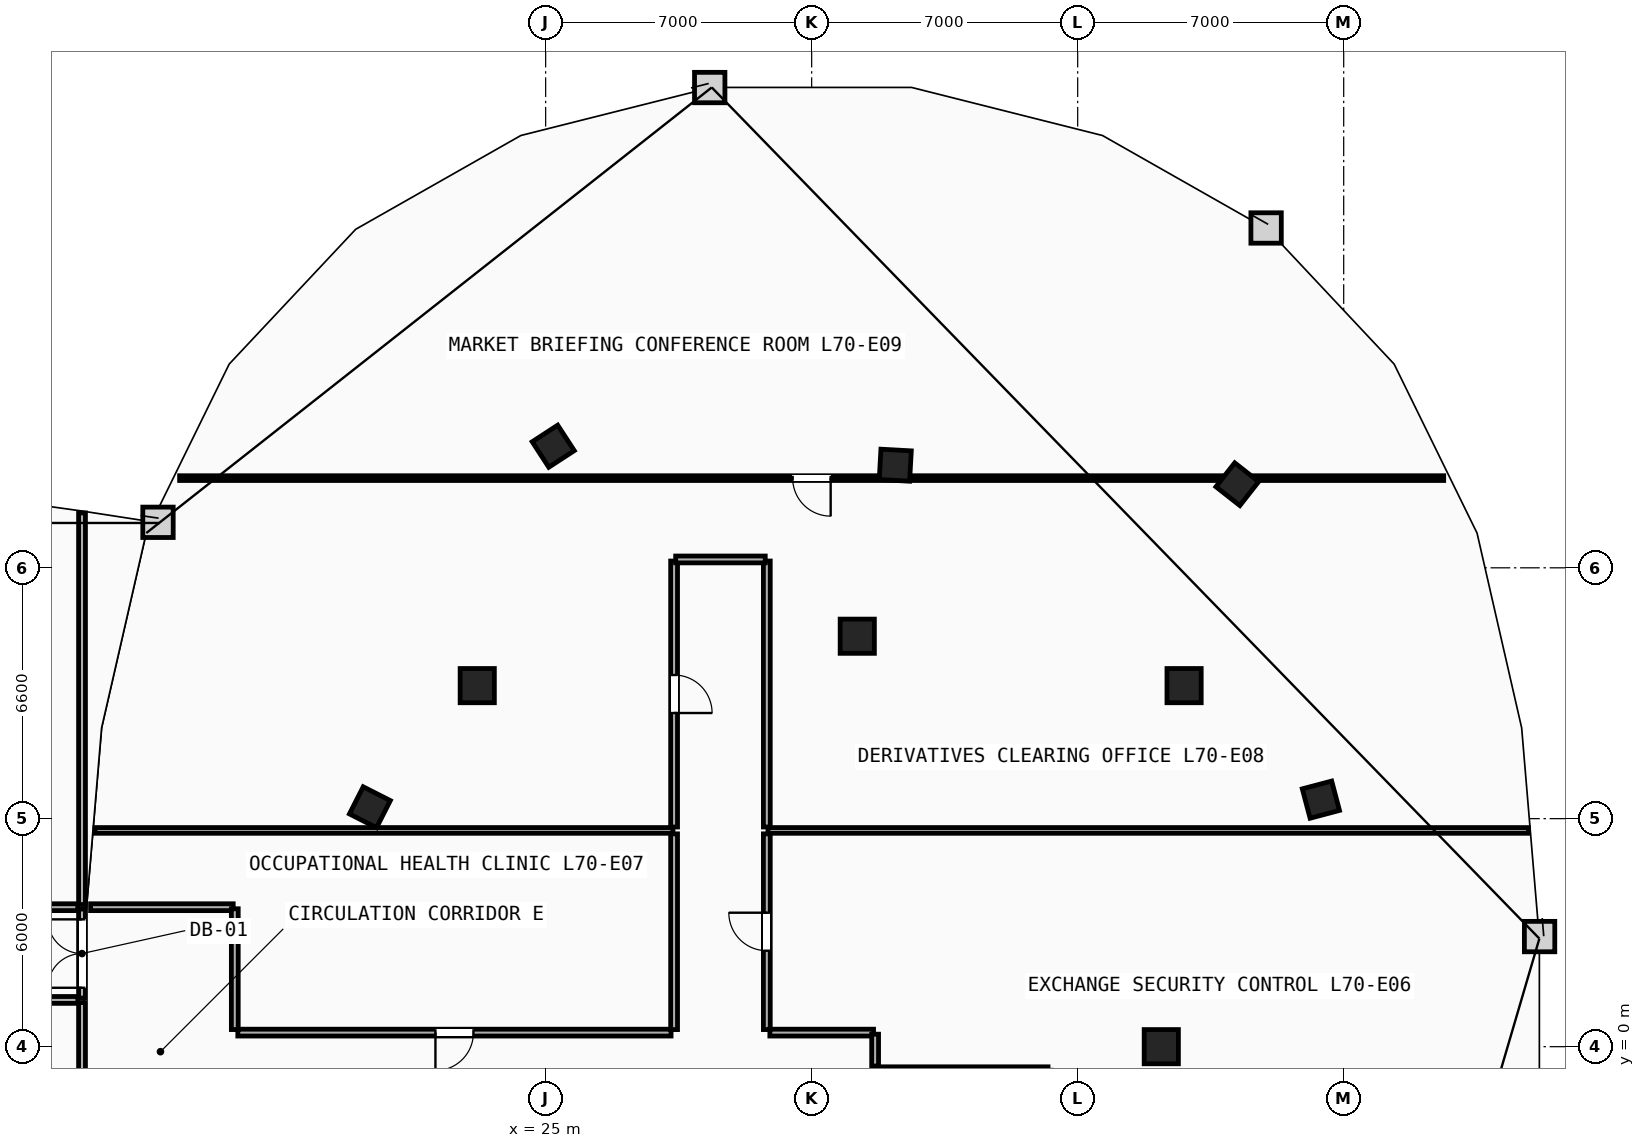
"""IFC4 building model, lengths in metres.
Left out: names, types, materials, properties, quantities, classifications, styles, units other than length and angle.
Written with IfcOpenShell. Run it as: python <this file> out.ifc"""

import sys

from ifc_helpers import new_model, si_unit, direction, frame, frame_2d, origin, origin_2d, place, context, subcontext, project, spatial, rectangle, extrude, element, fill, save


model = new_model("IFC4")
c1 = context("Model", 3, precision=1e-05, world=origin(), true_north=direction((0.0, 1.0)))
c2 = subcontext(c1, "Body", "Model", "MODEL_VIEW")
j1 = project(units=[si_unit("LENGTHUNIT", "METRE"), si_unit("PLANEANGLEUNIT", "RADIAN")], contexts=[c1])
p1 = place(None, origin())
s1 = spatial("IfcSite", under=j1, at=p1, CompositionType="ELEMENT")
p2 = place(p1, origin())
s2 = spatial("IfcBuilding", under=s1, at=p2, CompositionType="ELEMENT")
p3 = place(p2, frame((0.0, 0.0, 264.8)))
s3 = spatial("IfcBuildingStorey", under=s2, at=p3, CompositionType="ELEMENT", Elevation=264.8)
for number, where, z_axis, x_axis in (
    (1, (41.2, 0.0, 0.0), (0.0, 0.0, 1.0), (1.0, 0.0, 0.0)),
    (2, (41.8, 9.5, 0.0), (0.0, 0.0, 1.0), (1.0, 0.0, 0.0)),
    (3, (33.2, 10.8, 0.0), (0.0, 0.0, 1.0), (1.0, 0.0, 0.0)),
    (4, (23.2, 9.5, 0.0), (0.0, 0.0, 1.0), (1.0, 0.0, 0.0)),
):
    element("IfcColumn", number, at=place(p3, frame(where, z_axis=z_axis, x_axis=x_axis)), inside=s3, PredefinedType="COLUMN", context=c2, shape_type="SweptSolid", body=[
        extrude(rectangle(XDim=0.9, YDim=0.9, at=origin_2d()), origin(), (0.0, 0.0, 1.0), 3.6),
    ])
for number, where, z_axis, x_axis in (
    (5, (45.4, 6.5, 0.0), (0.0, 0.0, 1.0), (-0.256, 0.967, 0.0)),
    (6, (43.2, 14.8, 0.0), (0.0, 0.0, 1.0), (-0.786, 0.618, 0.0)),
    (7, (34.2, 15.3, 0.0), (0.0, 0.0, 1.0), (-0.998, 0.055, 0.0)),
    (8, (25.2, 15.8, 0.0), (0.0, 0.0, 1.0), (-0.838, -0.546, 0.0)),
    (9, (20.375, 6.3, 0.0), (0.0, 0.0, 1.0), (-0.453, -0.892, 0.0)),
):
    element("IfcColumn", number, at=place(p3, frame(where, z_axis=z_axis, x_axis=x_axis)), inside=s3, PredefinedType="COLUMN", context=c2, shape_type="SweptSolid", body=[
        extrude(rectangle(XDim=0.8, YDim=0.8, at=origin_2d()), origin(), (0.0, 0.0, 1.0), 3.6),
    ])
p4 = place(p3, frame((33.74, -0.6, 0.0), z_axis=(0.0, 0.0, 1.0), x_axis=(1.0, 0.0, 0.0)))
e10 = element("IfcWall", 10, at=p4, inside=s3, PredefinedType="PARTITIONING", context=c2, shape_type="SweptSolid", body=[
    extrude(rectangle(XDim=4.48, YDim=0.14, at=frame_2d((2.24, 0.0))), origin(), (0.0, 0.0, 1.0), 3.34),
])
p5 = place(p3, frame((13.14, 5.69, 0.0), z_axis=(0.0, 0.0, 1.0), x_axis=(1.0, 0.0, 0.0)))
e11 = element("IfcWall", 11, at=p5, inside=s3, PredefinedType="PARTITIONING", context=c2, shape_type="SweptSolid", body=[
    extrude(rectangle(XDim=15.21, YDim=0.15, at=frame_2d((7.605, 0.0))), origin(), (0.0, 0.0, 1.0), 3.34),
])
p6 = place(p3, frame((30.85, 5.69, 0.0), z_axis=(0.0, 0.0, 1.0), x_axis=(1.0, 0.0, 0.0)))
e12 = element("IfcWall", 12, at=p6, inside=s3, PredefinedType="PARTITIONING", context=c2, shape_type="SweptSolid", body=[
    extrude(rectangle(XDim=20.01, YDim=0.15, at=frame_2d((10.005, 0.0))), origin(), (0.0, 0.0, 1.0), 3.34),
])
p7 = place(p3, frame((30.82, 0.45, 0.0), z_axis=(0.0, 0.0, 1.0), x_axis=(0.0, 1.0, 0.0)))
e13 = element("IfcWall", 13, at=p7, inside=s3, PredefinedType="PARTITIONING", context=c2, shape_type="SweptSolid", body=[
    extrude(rectangle(XDim=5.15, YDim=0.18, at=frame_2d((2.575, 0.0))), origin(), (0.0, 0.0, 1.0), 3.34),
])
p8 = place(p7, frame((2.075, 0.0, 0.0)))
e14 = element("IfcOpeningElement", 14, at=p8, cuts=e13, PredefinedType="OPENING", context=c2, shape_type="SweptSolid", body=[
    extrude(rectangle(XDim=1.0, YDim=2.15, at=frame_2d((0.5, 1.075))), frame((0.0, 0.1, 0.0), z_axis=(0.0, -1.0, 0.0), x_axis=(1.0, 0.0, 0.0)), (0.0, 0.0, 1.0), 0.2),
])
p9 = place(p3, frame((33.628, 0.37, 0.0), z_axis=(0.0, 0.0, 1.0), x_axis=(-1.0, 0.0, 0.0)))
e15 = element("IfcWall", 15, at=p9, inside=s3, PredefinedType="PARTITIONING", context=c2, shape_type="SweptSolid", body=[
    extrude(rectangle(XDim=2.729, YDim=0.18, at=frame_2d((1.364, 0.0))), origin(), (0.0, 0.0, 1.0), 3.34),
])
p10 = place(p3, frame((33.67, -0.509, 0.0), z_axis=(0.0, 0.0, 1.0), x_axis=(0.0, 1.0, 0.0)))
e16 = element("IfcWall", 16, at=p10, inside=s3, PredefinedType="PARTITIONING", context=c2, shape_type="SweptSolid", body=[
    extrude(rectangle(XDim=0.837, YDim=0.18, at=frame_2d((0.418, 0.0))), origin(), (0.0, 0.0, 1.0), 3.34),
])
p11 = place(p3, frame((28.3, 0.37, 0.0), z_axis=(0.0, 0.0, 1.0), x_axis=(-1.0, 0.0, 0.0)))
e17 = element("IfcWall", 17, at=p11, inside=s3, PredefinedType="PARTITIONING", context=c2, shape_type="SweptSolid", body=[
    extrude(rectangle(XDim=11.4, YDim=0.18, at=frame_2d((5.7, 0.0))), origin(), (0.0, 0.0, 1.0), 3.34),
])
p12 = place(p11, frame((5.2, 0.0, 0.0)))
e18 = element("IfcOpeningElement", 18, at=p12, cuts=e17, PredefinedType="OPENING", context=c2, shape_type="SweptSolid", body=[
    extrude(rectangle(XDim=1.0, YDim=2.15, at=frame_2d((0.5, 1.075))), frame((0.0, 0.1, 0.0), z_axis=(0.0, -1.0, 0.0), x_axis=(1.0, 0.0, 0.0)), (0.0, 0.0, 1.0), 0.2),
])
p13 = place(p3, frame((28.38, 5.6, 0.0), z_axis=(0.0, 0.0, 1.0), x_axis=(0.0, -1.0, 0.0)))
e19 = element("IfcWall", 19, at=p13, inside=s3, PredefinedType="PARTITIONING", context=c2, shape_type="SweptSolid", body=[
    extrude(rectangle(XDim=5.15, YDim=0.18, at=frame_2d((2.575, 0.0))), origin(), (0.0, 0.0, 1.0), 3.34),
])
p14 = place(p3, frame((16.779, 3.67, 0.0), z_axis=(0.0, 0.0, 1.0), x_axis=(-1.0, 0.0, 0.0)))
e20 = element("IfcWall", 20, at=p14, inside=s3, PredefinedType="PARTITIONING", context=c2, shape_type="SweptSolid", body=[
    extrude(rectangle(XDim=3.753, YDim=0.18, at=frame_2d((1.876, 0.0))), origin(), (0.0, 0.0, 1.0), 3.34),
])
p15 = place(p3, frame((16.82, 0.45, 0.0), z_axis=(0.0, 0.0, 1.0), x_axis=(0.0, 1.0, 0.0)))
e21 = element("IfcWall", 21, at=p15, inside=s3, PredefinedType="PARTITIONING", context=c2, shape_type="SweptSolid", body=[
    extrude(rectangle(XDim=3.178, YDim=0.18, at=frame_2d((1.589, 0.0))), origin(), (0.0, 0.0, 1.0), 3.34),
])
p16 = place(p3, frame((28.38, 12.779, 0.0), z_axis=(0.0, 0.0, 1.0), x_axis=(0.0, -1.0, 0.0)))
e22 = element("IfcWall", 22, at=p16, inside=s3, PredefinedType="PARTITIONING", context=c2, shape_type="SweptSolid", body=[
    extrude(rectangle(XDim=6.999, YDim=0.18, at=frame_2d((3.499, 0.0))), origin(), (0.0, 0.0, 1.0), 3.34),
])
p17 = place(p16, frame((2.999, 0.0, 0.0)))
e23 = element("IfcOpeningElement", 23, at=p17, cuts=e22, PredefinedType="OPENING", context=c2, shape_type="SweptSolid", body=[
    extrude(rectangle(XDim=1.0, YDim=2.15, at=frame_2d((0.5, 1.075))), frame((0.0, 0.1, 0.0), z_axis=(0.0, -1.0, 0.0), x_axis=(1.0, 0.0, 0.0)), (0.0, 0.0, 1.0), 0.2),
])
p18 = place(p3, frame((30.82, 5.78, 0.0), z_axis=(0.0, 0.0, 1.0), x_axis=(0.0, 1.0, 0.0)))
e24 = element("IfcWall", 24, at=p18, inside=s3, PredefinedType="PARTITIONING", context=c2, shape_type="SweptSolid", body=[
    extrude(rectangle(XDim=6.999, YDim=0.18, at=frame_2d((3.499, 0.0))), origin(), (0.0, 0.0, 1.0), 3.34),
])
p19 = place(p3, frame((30.779, 12.82, 0.0), z_axis=(0.0, 0.0, 1.0), x_axis=(-1.0, 0.0, 0.0)))
e25 = element("IfcWall", 25, at=p19, inside=s3, PredefinedType="PARTITIONING", context=c2, shape_type="SweptSolid", body=[
    extrude(rectangle(XDim=2.357, YDim=0.18, at=frame_2d((1.179, 0.0))), origin(), (0.0, 0.0, 1.0), 3.34),
])
p20 = place(p3, frame((48.632, 14.96, 0.0), z_axis=(0.0, 0.0, 1.0), x_axis=(-1.0, 0.0, 0.0)))
e26 = element("IfcWall", 26, at=p20, inside=s3, PredefinedType="PARTITIONING", context=c2, shape_type="SweptSolid", body=[
    extrude(rectangle(XDim=33.263, YDim=0.125, at=frame_2d((16.632, 0.0))), origin(), (0.0, 0.0, 1.0), 2.724),
])
p21 = place(p20, frame((16.132, 0.0, 0.0)))
e27 = element("IfcOpeningElement", 27, at=p21, cuts=e26, PredefinedType="OPENING", context=c2, shape_type="SweptSolid", body=[
    extrude(rectangle(XDim=1.0, YDim=2.15, at=frame_2d((0.5, 1.075))), frame((0.0, 0.073, 0.0), z_axis=(0.0, -1.0, 0.0), x_axis=(1.0, 0.0, 0.0)), (0.0, 0.0, 1.0), 0.145),
])
p22 = place(p3, frame((-2.105, 1.23, 0.0), z_axis=(0.0, 0.0, 1.0), x_axis=(1.0, 0.0, 0.0)))
e28 = element("IfcWall", 28, at=p22, inside=s3, PredefinedType="PARTITIONING", context=c2, shape_type="SweptSolid", body=[
    extrude(rectangle(XDim=14.793, YDim=0.18, at=frame_2d((7.397, 0.0))), origin(), (0.0, 0.0, 1.0), 3.34),
])
p23 = place(p22, frame((6.597, 0.0, 0.0)))
e29 = element("IfcOpeningElement", 29, at=p23, cuts=e28, PredefinedType="OPENING", context=c2, shape_type="SweptSolid", body=[
    extrude(rectangle(XDim=1.6, YDim=2.2, at=frame_2d((0.8, 1.1))), frame((0.0, 0.1, 0.0), z_axis=(0.0, -1.0, 0.0), x_axis=(1.0, 0.0, 0.0)), (0.0, 0.0, 1.0), 0.2),
])
p24 = place(p3, frame((12.688, 3.67, 0.0), z_axis=(0.0, 0.0, 1.0), x_axis=(-1.0, 0.0, 0.0)))
e30 = element("IfcWall", 30, at=p24, inside=s3, PredefinedType="PARTITIONING", context=c2, shape_type="SweptSolid", body=[
    extrude(rectangle(XDim=14.793, YDim=0.18, at=frame_2d((7.397, 0.0))), origin(), (0.0, 0.0, 1.0), 3.34),
])
p25 = place(p24, frame((6.597, 0.0, 0.0)))
e31 = element("IfcOpeningElement", 31, at=p25, cuts=e30, PredefinedType="OPENING", context=c2, shape_type="SweptSolid", body=[
    extrude(rectangle(XDim=1.6, YDim=2.2, at=frame_2d((0.8, 1.1))), frame((0.0, 0.1, 0.0), z_axis=(0.0, -1.0, 0.0), x_axis=(1.0, 0.0, 0.0)), (0.0, 0.0, 1.0), 0.2),
])
p26 = place(p3, frame((12.8, -14.044, 0.0), z_axis=(0.0, 0.0, 1.0), x_axis=(0.0, 1.0, 0.0)))
e32 = element("IfcWall", 32, at=p26, inside=s3, PredefinedType="PARTITIONING", context=c2, shape_type="SweptSolid", body=[
    extrude(rectangle(XDim=15.204, YDim=0.18, at=frame_2d((7.602, 0.0))), origin(), (0.0, 0.0, 1.0), 3.34),
])
p27 = place(p3, frame((12.8, 3.74, 0.0), z_axis=(0.0, 0.0, 1.0), x_axis=(0.0, 1.0, 0.0)))
e33 = element("IfcWall", 33, at=p27, inside=s3, PredefinedType="PARTITIONING", context=c2, shape_type="SweptSolid", body=[
    extrude(rectangle(XDim=10.304, YDim=0.18, at=frame_2d((5.152, 0.0))), origin(), (0.0, 0.0, 1.0), 3.34),
])
p28 = place(p3, frame((12.8, 1.28, 0.0), z_axis=(0.0, 0.0, 1.0), x_axis=(0.0, 1.0, 0.0)))
e34 = element("IfcWall", 34, at=p28, inside=s3, PredefinedType="PARTITIONING", context=c2, shape_type="SweptSolid", body=[
    extrude(rectangle(XDim=2.34, YDim=0.18, at=frame_2d((1.17, 0.0))), origin(), (0.0, 0.0, 1.0), 3.34),
])
p29 = place(p28, frame((0.27, 0.0, 0.0)))
e35 = element("IfcOpeningElement", 35, at=p29, cuts=e34, PredefinedType="OPENING", context=c2, shape_type="SweptSolid", body=[
    extrude(rectangle(XDim=1.8, YDim=2.25, at=frame_2d((0.9, 1.125))), frame((0.0, 0.1, 0.0), z_axis=(0.0, -1.0, 0.0), x_axis=(1.0, 0.0, 0.0)), (0.0, 0.0, 1.0), 0.2),
])
p30 = place(p21, origin())
e36 = element("IfcDoor", 36, at=p30, inside=s3, OperationType="SINGLE_SWING_LEFT", PredefinedType="DOOR", context=c2, shape_type="SweptSolid", body=[
    extrude(rectangle(XDim=1.0, YDim=2.15, at=frame_2d((0.5, 1.075))), frame((0.0, 0.025, 0.0), z_axis=(0.0, -1.0, 0.0), x_axis=(1.0, 0.0, 0.0)), (0.0, 0.0, 1.0), 0.05),
])
fill(e27, e36)
p31 = place(p12, origin())
e37 = element("IfcDoor", 37, at=p31, inside=s3, OperationType="SINGLE_SWING_RIGHT", PredefinedType="DOOR", context=c2, shape_type="SweptSolid", body=[
    extrude(rectangle(XDim=1.0, YDim=2.15, at=frame_2d((0.5, 1.075))), frame((0.0, 0.025, 0.0), z_axis=(0.0, -1.0, 0.0), x_axis=(1.0, 0.0, 0.0)), (0.0, 0.0, 1.0), 0.05),
])
fill(e18, e37)
p32 = place(p17, origin())
e38 = element("IfcDoor", 38, at=p32, inside=s3, OperationType="SINGLE_SWING_RIGHT", PredefinedType="DOOR", context=c2, shape_type="SweptSolid", body=[
    extrude(rectangle(XDim=1.0, YDim=2.15, at=frame_2d((0.5, 1.075))), frame((0.0, 0.025, 0.0), z_axis=(0.0, -1.0, 0.0), x_axis=(1.0, 0.0, 0.0)), (0.0, 0.0, 1.0), 0.05),
])
fill(e23, e38)
p33 = place(p8, origin())
e39 = element("IfcDoor", 39, at=p33, inside=s3, OperationType="SINGLE_SWING_RIGHT", PredefinedType="DOOR", context=c2, shape_type="SweptSolid", body=[
    extrude(rectangle(XDim=1.0, YDim=2.15, at=frame_2d((0.5, 1.075))), frame((0.0, 0.025, 0.0), z_axis=(0.0, -1.0, 0.0), x_axis=(1.0, 0.0, 0.0)), (0.0, 0.0, 1.0), 0.05),
])
fill(e14, e39)
p34 = place(p29, origin())
e40 = element("IfcDoor", 40, at=p34, inside=s3, OperationType="DOUBLE_DOOR_SINGLE_SWING", PredefinedType="DOOR", context=c2, shape_type="SweptSolid", body=[
    extrude(rectangle(XDim=1.8, YDim=2.25, at=frame_2d((0.9, 1.125))), frame((0.0, 0.025, 0.0), z_axis=(0.0, -1.0, 0.0), x_axis=(1.0, 0.0, 0.0)), (0.0, 0.0, 1.0), 0.05),
])
fill(e35, e40)
save(model, sys.argv[1])
